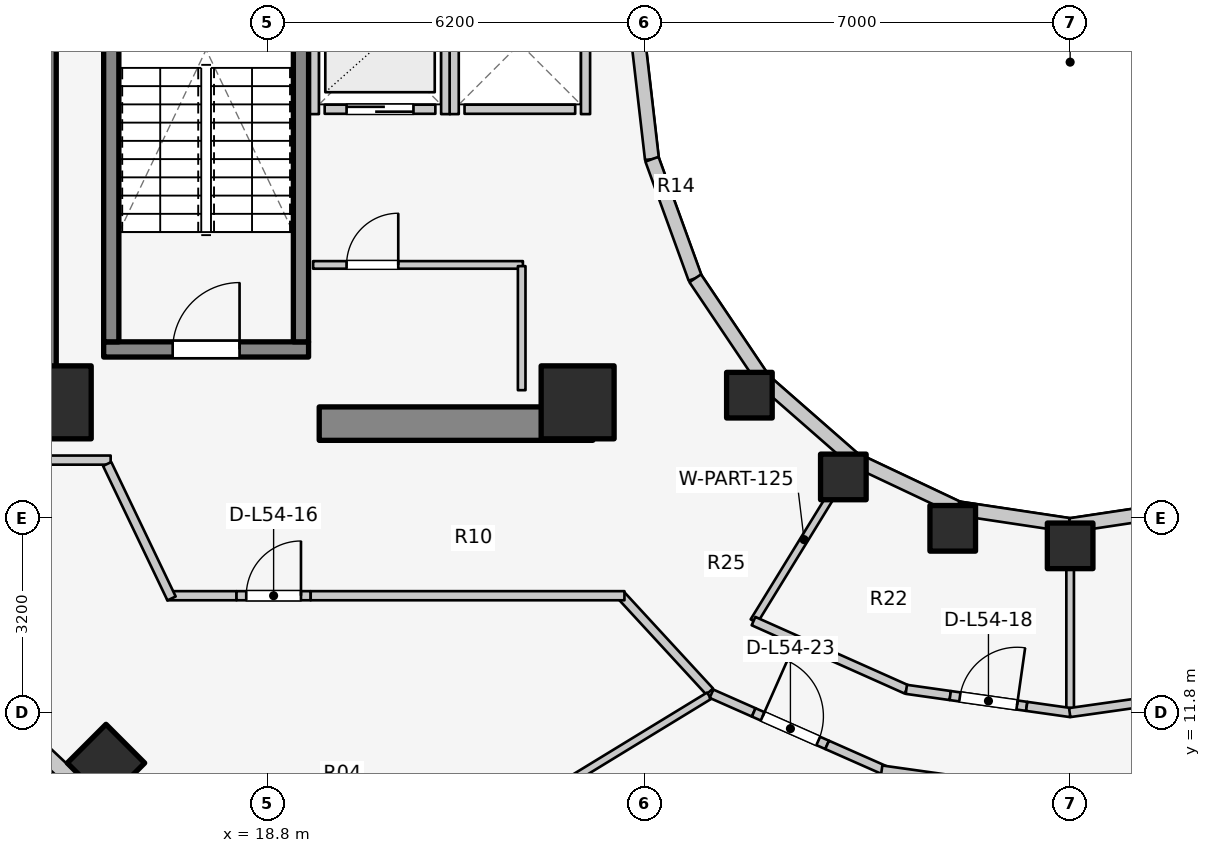
"""IFC4 building model, lengths in metres.
Left out: names, types, materials, properties, quantities, classifications, styles, units other than length and angle.
Written with IfcOpenShell. Run it as: python <this file> out.ifc"""

import sys

from ifc_helpers import new_model, si_unit, direction, frame, frame_2d, origin, origin_2d, place, context, subcontext, project, spatial, rectangle, extrude, element, fill, save


model = new_model("IFC4")
c1 = context("Model", 3, precision=1e-05, world=origin(), true_north=direction((0.0, 1.0)))
c2 = subcontext(c1, "Body", "Model", "MODEL_VIEW")
j1 = project(units=[si_unit("LENGTHUNIT", "METRE"), si_unit("PLANEANGLEUNIT", "RADIAN")], contexts=[c1])
p1 = place(None, origin())
s1 = spatial("IfcSite", under=j1, at=p1, CompositionType="ELEMENT")
p2 = place(p1, origin())
s2 = spatial("IfcBuilding", under=s1, at=p2, CompositionType="ELEMENT")
p3 = place(p2, frame((0.0, 0.0, 177.7)))
s3 = spatial("IfcBuildingStorey", under=s2, at=p3, CompositionType="ELEMENT", Elevation=177.7)
p4 = place(p3, frame((15.05, 17.05, 0.0), z_axis=(0.0, 0.0, 1.0), x_axis=(0.0, 1.0, 0.0)))
e1 = element("IfcWall", 1, at=p4, inside=s3, PredefinedType="SHEAR", context=c2, shape_type="SweptSolid", body=[
    extrude(rectangle(XDim=12.8, YDim=0.55, at=frame_2d((6.4, 0.0))), origin(), (0.0, 0.0, 1.0), 3.1),
])
p5 = place(p3, frame((19.65, 16.55, 0.0), z_axis=(0.0, 0.0, 1.0), x_axis=(1.0, 0.0, 0.0)))
e2 = element("IfcWall", 2, at=p5, inside=s3, PredefinedType="SHEAR", context=c2, shape_type="SweptSolid", body=[
    extrude(rectangle(XDim=4.5, YDim=0.55, at=frame_2d((2.25, 0.0))), origin(), (0.0, 0.0, 1.0), 3.1),
])
p6 = place(p3, frame((16.105, 17.77, 0.0), z_axis=(0.0, 0.0, 1.0), x_axis=(1.0, 0.0, 0.0)))
e3 = element("IfcWall", 3, at=p6, inside=s3, PredefinedType="SOLIDWALL", context=c2, shape_type="SweptSolid", body=[
    extrude(rectangle(XDim=3.37, YDim=0.25, at=frame_2d((1.685, 0.0))), origin(), (0.0, 0.0, 1.0), 3.1),
])
p7 = place(p6, frame((1.135, 0.0, 0.0)))
e4 = element("IfcOpeningElement", 4, at=p7, cuts=e3, PredefinedType="OPENING", context=c2, shape_type="SweptSolid", body=[
    extrude(rectangle(XDim=1.1, YDim=2.1, at=frame_2d((0.55, 1.05))), frame((0.0, 0.135, 0.0), z_axis=(0.0, -1.0, 0.0), x_axis=(1.0, 0.0, 0.0)), (0.0, 0.0, 1.0), 0.27),
])
for number, where, z_axis, x_axis in (
    (5, (16.23, 17.895, 0.0), (0.0, 0.0, 1.0), (0.0, 1.0, 0.0)),
    (6, (19.35, 17.895, 0.0), (0.0, 0.0, 1.0), (0.0, 1.0, 0.0)),
):
    element("IfcWall", number, at=place(p3, frame(where, z_axis=z_axis, x_axis=x_axis)), inside=s3, PredefinedType="SOLIDWALL", context=c2, shape_type="SweptSolid", body=[
        extrude(rectangle(XDim=7.81, YDim=0.25, at=frame_2d((3.905, 0.0))), origin(), (0.0, 0.0, 1.0), 3.1),
    ])
for number, where, z_axis, x_axis in (
    (7, (15.3, 16.9, 0.0), (0.0, 0.0, 1.0), (1.0, 0.0, 0.0)),
    (8, (23.9, 16.9, 0.0), (0.0, 0.0, 1.0), (1.0, 0.0, 0.0)),
):
    element("IfcColumn", number, at=place(p3, frame(where, z_axis=z_axis, x_axis=x_axis)), inside=s3, PredefinedType="COLUMN", context=c2, shape_type="SweptSolid", body=[
        extrude(rectangle(XDim=1.2, YDim=1.2, at=origin_2d()), origin(), (0.0, 0.0, 1.0), 3.1),
    ])
p8 = place(p3, frame((26.725, 17.018, 0.0), z_axis=(0.0, 0.0, 1.0), x_axis=(1.0, 0.0, 0.0)))
e9 = element("IfcColumn", 9, at=p8, inside=s3, PredefinedType="COLUMN", context=c2, shape_type="SweptSolid", body=[
    extrude(rectangle(XDim=0.75, YDim=0.75, at=origin_2d()), origin(), (0.0, 0.0, 1.0), 3.1),
])
p9 = place(p3, frame((16.143, 10.969, 0.0), z_axis=(0.0, 0.0, 1.0), x_axis=(-0.707106781187, -0.707106781187, 0.0)))
e10 = element("IfcColumn", 10, at=p9, inside=s3, PredefinedType="COLUMN", context=c2, shape_type="SweptSolid", body=[
    extrude(rectangle(XDim=0.9, YDim=0.9, at=origin_2d()), origin(), (0.0, 0.0, 1.0), 3.1),
])
for number, where, z_axis, x_axis in (
    (11, (28.27, 15.673, 0.0), (0.0, 0.0, 1.0), (1.0, 0.0, 0.0)),
    (12, (30.069, 14.828, 0.0), (0.0, 0.0, 1.0), (1.0, 0.0, 0.0)),
    (13, (32.0, 14.54, 0.0), (0.0, 0.0, 1.0), (1.0, 0.0, 0.0)),
):
    element("IfcColumn", number, at=place(p3, frame(where, z_axis=z_axis, x_axis=x_axis)), inside=s3, PredefinedType="COLUMN", context=c2, shape_type="SweptSolid", body=[
        extrude(rectangle(XDim=0.75, YDim=0.75, at=origin_2d()), origin(), (0.0, 0.0, 1.0), 3.1),
    ])
p10 = place(p3, frame((24.88, 23.0, 0.0), z_axis=(0.0, 0.0, 1.0), x_axis=(0.114711713601, -0.993398823617, 0.0)))
e14 = element("IfcWall", 14, at=p10, inside=s3, PredefinedType="STANDARD", context=c2, shape_type="SweptSolid", body=[
    extrude(rectangle(XDim=2.115, YDim=0.23, at=frame_2d((1.058, 0.0))), origin(), (0.0, 0.0, 1.0), 2.56),
])
p11 = place(p3, frame((25.123, 20.898, 0.0), z_axis=(0.0, 0.0, 1.0), x_axis=(0.341423187295, -0.93990968033, 0.0)))
e15 = element("IfcWall", 15, at=p11, inside=s3, PredefinedType="STANDARD", context=c2, shape_type="SweptSolid", body=[
    extrude(rectangle(XDim=2.084, YDim=0.23, at=frame_2d((1.042, 0.0))), origin(), (0.0, 0.0, 1.0), 2.56),
])
p12 = place(p3, frame((25.834, 18.94, 0.0), z_axis=(0.0, 0.0, 1.0), x_axis=(0.558197800898, -0.829707909492, 0.0)))
e16 = element("IfcWall", 16, at=p12, inside=s3, PredefinedType="STANDARD", context=c2, shape_type="SweptSolid", body=[
    extrude(rectangle(XDim=2.027, YDim=0.23, at=frame_2d((1.013, 0.0))), origin(), (0.0, 0.0, 1.0), 1.22),
])
p13 = place(p3, frame((26.965, 17.258, 0.0), z_axis=(0.0, 0.0, 1.0), x_axis=(0.752576694707, -0.658504607869, 0.0)))
e17 = element("IfcWall", 17, at=p13, inside=s3, PredefinedType="STANDARD", context=c2, shape_type="SweptSolid", body=[
    extrude(rectangle(XDim=1.959, YDim=0.23, at=frame_2d((0.98, 0.0))), origin(), (0.0, 0.0, 1.0), 1.22),
])
p14 = place(p3, frame((28.44, 15.968, 0.0), z_axis=(0.0, 0.0, 1.0), x_axis=(0.904179699603, -0.427152280606, 0.0)))
e18 = element("IfcWall", 18, at=p14, inside=s3, PredefinedType="STANDARD", context=c2, shape_type="SweptSolid", body=[
    extrude(rectangle(XDim=1.899, YDim=0.23, at=frame_2d((0.95, 0.0))), origin(), (0.0, 0.0, 1.0), 1.22),
])
for number, where, z_axis, x_axis in (
    (19, (30.157, 15.157, 0.0), (0.0, 0.0, 1.0), (0.989, -0.149, 0.0)),
    (20, (32.0, 14.88, 0.0), (0.0, 0.0, 1.0), (0.989, 0.149, 0.0)),
):
    element("IfcWall", number, at=place(p3, frame(where, z_axis=z_axis, x_axis=x_axis)), inside=s3, PredefinedType="STANDARD", context=c2, shape_type="SweptSolid", body=[
        extrude(rectangle(XDim=1.864, YDim=0.23, at=frame_2d((0.932, 0.0))), origin(), (0.0, 0.0, 1.0), 1.22),
    ])
p15 = place(p3, frame((12.381, 13.716, 0.0), z_axis=(0.0, 0.0, 1.0), x_axis=(0.727667301037, -0.68593024354, 0.0)))
e21 = element("IfcWall", 21, at=p15, inside=s3, PredefinedType="STANDARD", context=c2, shape_type="SweptSolid", body=[
    extrude(rectangle(XDim=4.604, YDim=0.26, at=frame_2d((2.302, 0.0))), origin(), (0.0, 0.0, 1.0), 1.22),
])
p16 = place(p15, frame((1.702, 0.0, 0.15)))
e22 = element("IfcOpeningElement", 22, at=p16, cuts=e21, PredefinedType="OPENING", context=c2, shape_type="SweptSolid", body=[
    extrude(rectangle(XDim=1.2, YDim=0.9, at=frame_2d((0.6, 0.45))), frame((0.0, 0.14, 0.0), z_axis=(0.0, -1.0, 0.0), x_axis=(1.0, 0.0, 0.0)), (0.0, 0.0, 1.0), 0.28),
])
p17 = place(p3, frame((19.74, 21.72, 0.0), z_axis=(0.0, 0.0, 1.0), x_axis=(1.0, 0.0, 0.0)))
e23 = element("IfcWall", 23, at=p17, inside=s3, PredefinedType="SOLIDWALL", context=c2, shape_type="SweptSolid", body=[
    extrude(rectangle(XDim=1.82, YDim=0.15, at=frame_2d((0.91, 0.0))), origin(), (0.0, 0.0, 1.0), 2.575),
])
p18 = place(p17, frame((0.36, 0.0, 0.0)))
e24 = element("IfcOpeningElement", 24, at=p18, cuts=e23, PredefinedType="OPENING", context=c2, shape_type="SweptSolid", body=[
    extrude(rectangle(XDim=1.1, YDim=2.1, at=frame_2d((0.55, 1.05))), frame((0.0, 0.085, 0.0), z_axis=(0.0, -1.0, 0.0), x_axis=(1.0, 0.0, 0.0)), (0.0, 0.0, 1.0), 0.17),
])
for number, where, z_axis, x_axis in (
    (25, (19.57, 21.64, 0.0), (0.0, 0.0, 1.0), (0.0, 1.0, 0.0)),
    (26, (21.73, 21.64, 0.0), (0.0, 0.0, 1.0), (0.0, 1.0, 0.0)),
):
    element("IfcWall", number, at=place(p3, frame(where, z_axis=z_axis, x_axis=x_axis)), inside=s3, PredefinedType="SOLIDWALL", context=c2, shape_type="SweptSolid", body=[
        extrude(rectangle(XDim=2.32, YDim=0.15, at=frame_2d((1.16, 0.0))), origin(), (0.0, 0.0, 1.0), 2.575),
    ])
p19 = place(p3, frame((22.04, 21.72, 0.0), z_axis=(0.0, 0.0, 1.0), x_axis=(1.0, 0.0, 0.0)))
e27 = element("IfcWall", 27, at=p19, inside=s3, PredefinedType="SOLIDWALL", context=c2, shape_type="SweptSolid", body=[
    extrude(rectangle(XDim=1.82, YDim=0.15, at=frame_2d((0.91, 0.0))), origin(), (0.0, 0.0, 1.0), 2.12),
])
p20 = place(p3, frame((21.87, 21.64, 0.0), z_axis=(0.0, 0.0, 1.0), x_axis=(0.0, 1.0, 0.0)))
e28 = element("IfcWall", 28, at=p20, inside=s3, PredefinedType="SOLIDWALL", context=c2, shape_type="SweptSolid", body=[
    extrude(rectangle(XDim=2.32, YDim=0.15, at=frame_2d((1.16, 0.0))), origin(), (0.0, 0.0, 1.0), 2.575),
])
p21 = place(p3, frame((24.03, 21.64, 0.0), z_axis=(0.0, 0.0, 1.0), x_axis=(0.0, 1.0, 0.0)))
e29 = element("IfcWall", 29, at=p21, inside=s3, PredefinedType="SOLIDWALL", context=c2, shape_type="SweptSolid", body=[
    extrude(rectangle(XDim=2.32, YDim=0.15, at=frame_2d((1.16, 0.0))), origin(), (0.0, 0.0, 1.0), 2.12),
])
p22 = place(p3, frame((19.55, 19.16, 0.0), z_axis=(0.0, 0.0, 1.0), x_axis=(1.0, 0.0, 0.0)))
e30 = element("IfcWall", 30, at=p22, inside=s3, PredefinedType="PARTITIONING", context=c2, shape_type="SweptSolid", body=[
    extrude(rectangle(XDim=3.45, YDim=0.125, at=frame_2d((1.725, 0.0))), origin(), (0.0, 0.0, 1.0), 2.12),
])
p23 = place(p22, frame((0.55, 0.0, 0.0)))
e31 = element("IfcOpeningElement", 31, at=p23, cuts=e30, PredefinedType="OPENING", context=c2, shape_type="SweptSolid", body=[
    extrude(rectangle(XDim=0.85, YDim=2.05, at=frame_2d((0.425, 1.025))), frame((0.0, 0.073, 0.0), z_axis=(0.0, -1.0, 0.0), x_axis=(1.0, 0.0, 0.0)), (0.0, 0.0, 1.0), 0.145),
])
p24 = place(p3, frame((22.98, 17.1, 0.0), z_axis=(0.0, 0.0, 1.0), x_axis=(0.0, 1.0, 0.0)))
e32 = element("IfcWall", 32, at=p24, inside=s3, PredefinedType="PARTITIONING", context=c2, shape_type="SweptSolid", body=[
    extrude(rectangle(XDim=2.04, YDim=0.125, at=frame_2d((1.02, 0.0))), origin(), (0.0, 0.0, 1.0), 2.575),
])
p25 = place(p3, frame((10.96, 15.95, 0.0), z_axis=(0.0, 0.0, 1.0), x_axis=(1.0, 0.0, 0.0)))
e33 = element("IfcWall", 33, at=p25, inside=s3, PredefinedType="PARTITIONING", context=c2, shape_type="SweptSolid", body=[
    extrude(rectangle(XDim=5.26, YDim=0.15, at=frame_2d((2.63, 0.0))), origin(), (0.0, 0.0, 1.0), 1.22),
])
p26 = place(p3, frame((26.072, 12.144, 0.0), z_axis=(0.0, 0.0, 1.0), x_axis=(-0.677579737957, 0.735449317567, 0.0)))
e34 = element("IfcWall", 34, at=p26, inside=s3, PredefinedType="PARTITIONING", context=c2, shape_type="SweptSolid", body=[
    extrude(rectangle(XDim=2.173, YDim=0.15, at=frame_2d((1.086, 0.0))), origin(), (0.0, 0.0, 1.0), 2.019),
])
p27 = place(p3, frame((17.15, 13.72, 0.0), z_axis=(0.0, 0.0, 1.0), x_axis=(1.0, 0.0, 0.0)))
e35 = element("IfcWall", 35, at=p27, inside=s3, PredefinedType="PARTITIONING", context=c2, shape_type="SweptSolid", body=[
    extrude(rectangle(XDim=1.14, YDim=0.15, at=frame_2d((0.57, 0.0))), origin(), (0.0, 0.0, 1.0), 2.575),
])
p28 = place(p3, frame((18.29, 13.72, 0.0), z_axis=(0.0, 0.0, 1.0), x_axis=(1.0, 0.0, 0.0)))
e36 = element("IfcWall", 36, at=p28, inside=s3, PredefinedType="PARTITIONING", context=c2, shape_type="SweptSolid", body=[
    extrude(rectangle(XDim=1.22, YDim=0.15, at=frame_2d((0.61, 0.0))), origin(), (0.0, 0.0, 1.0), 2.575),
])
p29 = place(p28, frame((0.16, 0.0, 0.0)))
e37 = element("IfcOpeningElement", 37, at=p29, cuts=e36, PredefinedType="OPENING", context=c2, shape_type="SweptSolid", body=[
    extrude(rectangle(XDim=0.9, YDim=2.1, at=frame_2d((0.45, 1.05))), frame((0.0, 0.085, 0.0), z_axis=(0.0, -1.0, 0.0), x_axis=(1.0, 0.0, 0.0)), (0.0, 0.0, 1.0), 0.17),
])
p30 = place(p3, frame((19.51, 13.72, 0.0), z_axis=(0.0, 0.0, 1.0), x_axis=(1.0, 0.0, 0.0)))
e38 = element("IfcWall", 38, at=p30, inside=s3, PredefinedType="PARTITIONING", context=c2, shape_type="SweptSolid", body=[
    extrude(rectangle(XDim=5.16, YDim=0.15, at=frame_2d((2.58, 0.0))), origin(), (0.0, 0.0, 1.0), 2.019),
])
p31 = place(p3, frame((17.222, 13.675, 0.0), z_axis=(0.0, 0.0, 1.0), x_axis=(-0.431973389813, 0.901886351207, 0.0)))
e39 = element("IfcWall", 39, at=p31, inside=s3, PredefinedType="PARTITIONING", context=c2, shape_type="SweptSolid", body=[
    extrude(rectangle(XDim=2.452, YDim=0.15, at=frame_2d((1.226, 0.0))), origin(), (0.0, 0.0, 1.0), 2.575),
])
p32 = place(p3, frame((28.45, 15.985, 0.0), z_axis=(0.0, 0.0, 1.0), x_axis=(-0.523587550846, -0.851971875474, 0.0)))
e40 = element("IfcWall", 40, at=p32, inside=s3, PredefinedType="PARTITIONING", context=c2, shape_type="SweptSolid", body=[
    extrude(rectangle(XDim=3.153, YDim=0.125, at=frame_2d((1.577, 0.0))), origin(), (0.0, 0.0, 1.0), 2.019),
])
p33 = place(p3, frame((32.0, 14.9, 0.0), z_axis=(0.0, 0.0, 1.0), x_axis=(0.0, -1.0, 0.0)))
e41 = element("IfcWall", 41, at=p33, inside=s3, PredefinedType="PARTITIONING", context=c2, shape_type="SweptSolid", body=[
    extrude(rectangle(XDim=3.102, YDim=0.125, at=frame_2d((1.551, 0.0))), origin(), (0.0, 0.0, 1.0), 2.019),
])
p34 = place(p3, frame((26.793, 13.303, 0.0), z_axis=(0.0, 0.0, 1.0), x_axis=(0.913145536541, -0.407633694749, 0.0)))
e42 = element("IfcWall", 42, at=p34, inside=s3, PredefinedType="PARTITIONING", context=c2, shape_type="SweptSolid", body=[
    extrude(rectangle(XDim=2.756, YDim=0.15, at=frame_2d((1.378, 0.0))), origin(), (0.0, 0.0, 1.0), 2.019),
])
p35 = place(p3, frame((29.306, 12.18, 0.0), z_axis=(0.0, 0.0, 1.0), x_axis=(0.990156034925, -0.139967948123, 0.0)))
e43 = element("IfcWall", 43, at=p35, inside=s3, PredefinedType="PARTITIONING", context=c2, shape_type="SweptSolid", body=[
    extrude(rectangle(XDim=0.729, YDim=0.15, at=frame_2d((0.365, 0.0))), origin(), (0.0, 0.0, 1.0), 2.575),
])
p36 = place(p3, frame((30.028, 12.078, 0.0), z_axis=(0.0, 0.0, 1.0), x_axis=(0.990133183593, -0.140129507055, 0.0)))
e44 = element("IfcWall", 44, at=p36, inside=s3, PredefinedType="PARTITIONING", context=c2, shape_type="SweptSolid", body=[
    extrude(rectangle(XDim=1.27, YDim=0.15, at=frame_2d((0.635, 0.0))), origin(), (0.0, 0.0, 1.0), 2.575),
])
p37 = place(p36, frame((0.16, 0.0, 0.0)))
e45 = element("IfcOpeningElement", 45, at=p37, cuts=e44, PredefinedType="OPENING", context=c2, shape_type="SweptSolid", body=[
    extrude(rectangle(XDim=0.95, YDim=2.1, at=frame_2d((0.475, 1.05))), frame((0.0, 0.085, 0.0), z_axis=(0.0, -1.0, 0.0), x_axis=(1.0, 0.0, 0.0)), (0.0, 0.0, 1.0), 0.17),
])
p38 = place(p3, frame((31.285, 11.9, 0.0), z_axis=(0.0, 0.0, 1.0), x_axis=(0.990156034925, -0.139967948123, 0.0)))
e46 = element("IfcWall", 46, at=p38, inside=s3, PredefinedType="PARTITIONING", context=c2, shape_type="SweptSolid", body=[
    extrude(rectangle(XDim=0.729, YDim=0.15, at=frame_2d((0.365, 0.0))), origin(), (0.0, 0.0, 1.0), 2.019),
])
p39 = place(p3, frame((31.993, 11.798, 0.0), z_axis=(0.0, 0.0, 1.0), x_axis=(0.990145400278, 0.140043158738, 0.0)))
e47 = element("IfcWall", 47, at=p39, inside=s3, PredefinedType="PARTITIONING", context=c2, shape_type="SweptSolid", body=[
    extrude(rectangle(XDim=2.728, YDim=0.15, at=frame_2d((1.364, 0.0))), origin(), (0.0, 0.0, 1.0), 2.019),
])
p40 = place(p3, frame((26.062, 12.075, 0.0), z_axis=(0.0, 0.0, 1.0), x_axis=(-0.853440334679, -0.521190555501, 0.0)))
e48 = element("IfcWall", 48, at=p40, inside=s3, PredefinedType="PARTITIONING", context=c2, shape_type="SweptSolid", body=[
    extrude(rectangle(XDim=6.966, YDim=0.125, at=frame_2d((3.483, 0.0))), origin(), (0.0, 0.0, 1.0), 1.22),
])
p41 = place(p3, frame((28.914, 10.805, 0.0), z_axis=(0.0, 0.0, 1.0), x_axis=(-0.660581320981, -0.750754499401, 0.0)))
e49 = element("IfcWall", 49, at=p41, inside=s3, PredefinedType="PARTITIONING", context=c2, shape_type="SweptSolid", body=[
    extrude(rectangle(XDim=6.027, YDim=0.125, at=frame_2d((3.013, 0.0))), origin(), (0.0, 0.0, 1.0), 1.22),
])
p42 = place(p3, frame((26.102, 12.108, 0.0), z_axis=(0.0, 0.0, 1.0), x_axis=(0.914526186943, -0.404526702945, 0.0)))
e50 = element("IfcWall", 50, at=p42, inside=s3, PredefinedType="PARTITIONING", context=c2, shape_type="SweptSolid", body=[
    extrude(rectangle(XDim=0.759, YDim=0.15, at=frame_2d((0.38, 0.0))), origin(), (0.0, 0.0, 1.0), 2.575),
])
p43 = place(p3, frame((26.796, 11.801, 0.0), z_axis=(0.0, 0.0, 1.0), x_axis=(0.914549810084, -0.404473293155, 0.0)))
e51 = element("IfcWall", 51, at=p43, inside=s3, PredefinedType="PARTITIONING", context=c2, shape_type="SweptSolid", body=[
    extrude(rectangle(XDim=1.32, YDim=0.15, at=frame_2d((0.66, 0.0))), origin(), (0.0, 0.0, 1.0), 2.16),
])
p44 = place(p43, frame((0.16, 0.0, 0.0)))
e52 = element("IfcOpeningElement", 52, at=p44, cuts=e51, PredefinedType="OPENING", context=c2, shape_type="SweptSolid", body=[
    extrude(rectangle(XDim=1.0, YDim=2.1, at=frame_2d((0.5, 1.05))), frame((0.0, 0.085, 0.0), z_axis=(0.0, -1.0, 0.0), x_axis=(1.0, 0.0, 0.0)), (0.0, 0.0, 1.0), 0.17),
])
p45 = place(p3, frame((28.003, 11.267, 0.0), z_axis=(0.0, 0.0, 1.0), x_axis=(0.914475459316, -0.40464136505, 0.0)))
e53 = element("IfcWall", 53, at=p45, inside=s3, PredefinedType="PARTITIONING", context=c2, shape_type="SweptSolid", body=[
    extrude(rectangle(XDim=1.044, YDim=0.15, at=frame_2d((0.522, 0.0))), origin(), (0.0, 0.0, 1.0), 2.019),
])
p46 = place(p3, frame((28.901, 10.854, 0.0), z_axis=(0.0, 0.0, 1.0), x_axis=(0.990251283702, -0.139292480508, 0.0)))
e54 = element("IfcWall", 54, at=p46, inside=s3, PredefinedType="PARTITIONING", context=c2, shape_type="SweptSolid", body=[
    extrude(rectangle(XDim=3.179, YDim=0.15, at=frame_2d((1.59, 0.0))), origin(), (0.0, 0.0, 1.0), 2.019),
])
p47 = place(p3, frame((31.992, 10.418, 0.0), z_axis=(0.0, 0.0, 1.0), x_axis=(0.990254709652, 0.13926812274, 0.0)))
e55 = element("IfcWall", 55, at=p47, inside=s3, PredefinedType="PARTITIONING", context=c2, shape_type="SweptSolid", body=[
    extrude(rectangle(XDim=3.096, YDim=0.15, at=frame_2d((1.548, 0.0))), origin(), (0.0, 0.0, 1.0), 2.019),
])
p48 = place(p7, origin())
e56 = element("IfcDoor", 56, at=p48, inside=s3, OperationType="SINGLE_SWING_RIGHT", PredefinedType="DOOR", context=c2, shape_type="SweptSolid", body=[
    extrude(rectangle(XDim=1.1, YDim=2.1, at=frame_2d((0.55, 1.05))), frame((0.0, 0.025, 0.0), z_axis=(0.0, -1.0, 0.0), x_axis=(1.0, 0.0, 0.0)), (0.0, 0.0, 1.0), 0.05),
])
fill(e4, e56)
p49 = place(p18, origin())
e57 = element("IfcDoor", 57, at=p49, inside=s3, OperationType="DOUBLE_DOOR_SLIDING", PredefinedType="DOOR", context=c2, shape_type="SweptSolid", body=[
    extrude(rectangle(XDim=1.1, YDim=2.1, at=frame_2d((0.55, 1.05))), frame((0.0, 0.025, 0.0), z_axis=(0.0, -1.0, 0.0), x_axis=(1.0, 0.0, 0.0)), (0.0, 0.0, 1.0), 0.05),
])
fill(e24, e57)
p50 = place(p23, origin())
e58 = element("IfcDoor", 58, at=p50, inside=s3, OperationType="SINGLE_SWING_RIGHT", PredefinedType="DOOR", context=c2, shape_type="SweptSolid", body=[
    extrude(rectangle(XDim=0.85, YDim=2.05, at=frame_2d((0.425, 1.025))), frame((0.0, 0.025, 0.0), z_axis=(0.0, -1.0, 0.0), x_axis=(1.0, 0.0, 0.0)), (0.0, 0.0, 1.0), 0.05),
])
fill(e31, e58)
p51 = place(p29, origin())
e59 = element("IfcDoor", 59, at=p51, inside=s3, OperationType="SINGLE_SWING_RIGHT", PredefinedType="DOOR", context=c2, shape_type="SweptSolid", body=[
    extrude(rectangle(XDim=0.9, YDim=2.1, at=frame_2d((0.45, 1.05))), frame((0.0, 0.025, 0.0), z_axis=(0.0, -1.0, 0.0), x_axis=(1.0, 0.0, 0.0)), (0.0, 0.0, 1.0), 0.05),
])
fill(e37, e59)
p52 = place(p37, origin())
e60 = element("IfcDoor", 60, at=p52, inside=s3, OperationType="SINGLE_SWING_RIGHT", PredefinedType="DOOR", context=c2, shape_type="SweptSolid", body=[
    extrude(rectangle(XDim=0.95, YDim=2.1, at=frame_2d((0.475, 1.05))), frame((0.0, 0.025, 0.0), z_axis=(0.0, -1.0, 0.0), x_axis=(1.0, 0.0, 0.0)), (0.0, 0.0, 1.0), 0.05),
])
fill(e45, e60)
p53 = place(p44, origin())
e61 = element("IfcDoor", 61, at=p53, inside=s3, OperationType="SINGLE_SWING_LEFT", PredefinedType="DOOR", context=c2, shape_type="SweptSolid", body=[
    extrude(rectangle(XDim=1.0, YDim=2.1, at=frame_2d((0.5, 1.05))), frame((0.0, 0.025, 0.0), z_axis=(0.0, -1.0, 0.0), x_axis=(1.0, 0.0, 0.0)), (0.0, 0.0, 1.0), 0.05),
])
fill(e52, e61)
save(model, sys.argv[1])
